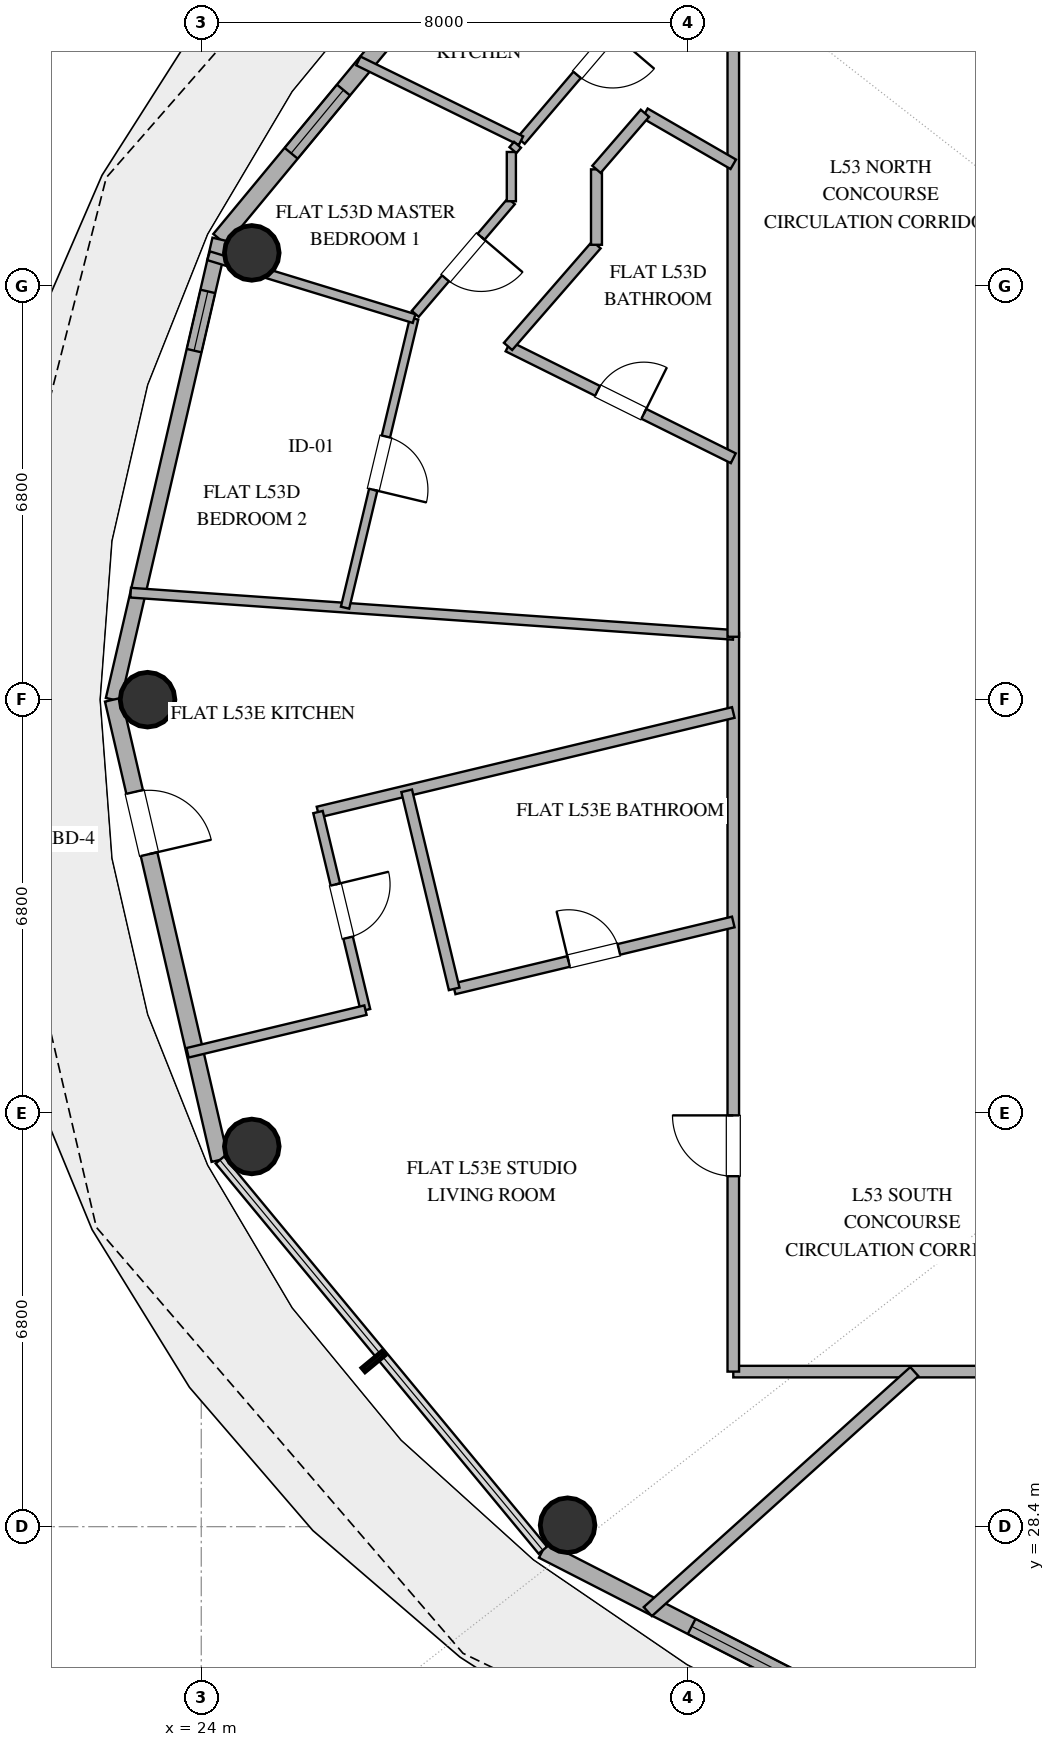
"""IFC4 building model, lengths in metres.
Left out: names, types, materials, properties, quantities, classifications, styles, units other than length and angle.
Written with IfcOpenShell. Run it as: python <this file> out.ifc"""

import sys

from ifc_helpers import new_model, si_unit, direction, frame, frame_2d, origin, origin_2d, place, context, subcontext, project, spatial, rectangle, hollow_circle, extrude, element, fill, save


model = new_model("IFC4")
c1 = context("Model", 3, precision=1e-05, world=origin(), true_north=direction((0.0, 1.0)))
c2 = subcontext(c1, "Body", "Model", "MODEL_VIEW")
j1 = project(units=[si_unit("LENGTHUNIT", "METRE"), si_unit("PLANEANGLEUNIT", "RADIAN")], contexts=[c1])
p1 = place(None, origin())
s1 = spatial("IfcSite", under=j1, at=p1, CompositionType="ELEMENT")
p2 = place(p1, origin())
s2 = spatial("IfcBuilding", under=s1, at=p2, CompositionType="ELEMENT")
p3 = place(p2, frame((0.0, 0.0, 210.0)))
s3 = spatial("IfcBuildingStorey", under=s2, at=p3, CompositionType="ELEMENT", Elevation=210.0)
for number, where, z_axis, x_axis in (
    (1, (24.831, 49.347, 0.0), (0.0, 0.0, 1.0), (1.0, 0.0, 0.0)),
    (2, (23.117, 42.0, 0.0), (0.0, 0.0, 1.0), (1.0, 0.0, 0.0)),
    (3, (24.831, 34.653, 0.0), (0.0, 0.0, 1.0), (1.0, 0.0, 0.0)),
    (4, (30.025, 28.424, 0.0), (0.0, 0.0, 1.0), (1.0, 0.0, 0.0)),
):
    element("IfcColumn", number, at=place(p3, frame(where, z_axis=z_axis, x_axis=x_axis)), inside=s3, PredefinedType="COLUMN", context=c2, shape_type="SweptSolid", body=[
        extrude(hollow_circle(Radius=0.45, WallThickness=0.025, at=origin_2d()), origin(), (0.0, 0.0, 1.0), 3.36),
    ])
p4 = place(p3, frame((29.617, 55.987, 0.0), z_axis=(0.0, 0.0, 1.0), x_axis=(-0.63761509934, -0.770355103243, 0.0)))
e5 = element("IfcWall", 5, at=p4, inside=s3, PredefinedType="SOLIDWALL", context=c2, shape_type="SweptSolid", body=[
    extrude(rectangle(XDim=8.33, YDim=0.28, at=frame_2d((4.165, 0.0))), origin(), (0.0, 0.0, 1.0), 3.36),
])
p5 = place(p4, frame((2.162, 0.0, 0.85)))
e6 = element("IfcOpeningElement", 6, at=p5, cuts=e5, PredefinedType="OPENING", context=c2, shape_type="SweptSolid", body=[
    extrude(rectangle(XDim=1.5, YDim=1.8, at=frame_2d((0.75, 0.9))), frame((0.0, 0.15, 0.0), z_axis=(0.0, -1.0, 0.0), x_axis=(1.0, 0.0, 0.0)), (0.0, 0.0, 1.0), 0.3),
])
p6 = place(p4, frame((5.142, 0.0, 0.85)))
e7 = element("IfcOpeningElement", 7, at=p6, cuts=e5, PredefinedType="OPENING", context=c2, shape_type="SweptSolid", body=[
    extrude(rectangle(XDim=1.35, YDim=1.8, at=frame_2d((0.675, 0.9))), frame((0.0, 0.15, 0.0), z_axis=(0.0, -1.0, 0.0), x_axis=(1.0, 0.0, 0.0)), (0.0, 0.0, 1.0), 0.3),
])
p7 = place(p3, frame((24.306, 49.57, 0.0), z_axis=(0.0, 0.0, 1.0), x_axis=(-0.225635078214, -0.974211892495, 0.0)))
e8 = element("IfcWall", 8, at=p7, inside=s3, PredefinedType="SOLIDWALL", context=c2, shape_type="SweptSolid", body=[
    extrude(rectangle(XDim=7.77, YDim=0.25, at=frame_2d((3.885, 0.0))), origin(), (0.0, 0.0, 1.0), 3.36),
])
p8 = place(p7, frame((0.878, 0.0, 0.35)))
e9 = element("IfcOpeningElement", 9, at=p8, cuts=e8, PredefinedType="OPENING", context=c2, shape_type="SweptSolid", body=[
    extrude(rectangle(XDim=1.0, YDim=1.05, at=frame_2d((0.5, 0.525))), frame((0.0, 0.135, 0.0), z_axis=(0.0, -1.0, 0.0), x_axis=(1.0, 0.0, 0.0)), (0.0, 0.0, 1.0), 0.27),
])
p9 = place(p3, frame((22.553, 42.0, 0.0), z_axis=(0.0, 0.0, 1.0), x_axis=(0.225635078214, -0.974211892495, 0.0)))
e10 = element("IfcWall", 10, at=p9, inside=s3, PredefinedType="SOLIDWALL", context=c2, shape_type="SweptSolid", body=[
    extrude(rectangle(XDim=7.77, YDim=0.28, at=frame_2d((3.885, 0.0))), origin(), (0.0, 0.0, 1.0), 3.36),
])
p10 = place(p9, frame((1.557, 0.0, 0.0)))
e11 = element("IfcOpeningElement", 11, at=p10, cuts=e10, PredefinedType="OPENING", context=c2, shape_type="SweptSolid", body=[
    extrude(rectangle(XDim=1.05, YDim=2.2, at=frame_2d((0.525, 1.1))), frame((0.0, 0.15, 0.0), z_axis=(0.0, -1.0, 0.0), x_axis=(1.0, 0.0, 0.0)), (0.0, 0.0, 1.0), 0.3),
])
p11 = place(p3, frame((29.617, 28.013, 0.0), z_axis=(0.0, 0.0, 1.0), x_axis=(0.890007394051, -0.455946091699, 0.0)))
e12 = element("IfcWall", 12, at=p11, inside=s3, PredefinedType="SOLIDWALL", context=c2, shape_type="SweptSolid", body=[
    extrude(rectangle(XDim=9.404, YDim=0.28, at=frame_2d((4.702, 0.0))), origin(), (0.0, 0.0, 1.0), 3.36),
])
p12 = place(p11, frame((2.751, 0.0, 0.85)))
e13 = element("IfcOpeningElement", 13, at=p12, cuts=e12, PredefinedType="OPENING", context=c2, shape_type="SweptSolid", body=[
    extrude(rectangle(XDim=2.1, YDim=2.2, at=frame_2d((1.05, 1.1))), frame((0.0, 0.15, 0.0), z_axis=(0.0, -1.0, 0.0), x_axis=(1.0, 0.0, 0.0)), (0.0, 0.0, 1.0), 0.3),
])
p13 = place(p11, frame((5.354, 0.0, 0.85)))
e14 = element("IfcOpeningElement", 14, at=p13, cuts=e12, PredefinedType="OPENING", context=c2, shape_type="SweptSolid", body=[
    extrude(rectangle(XDim=2.1, YDim=2.2, at=frame_2d((1.05, 1.1))), frame((0.0, 0.15, 0.0), z_axis=(0.0, -1.0, 0.0), x_axis=(1.0, 0.0, 0.0)), (0.0, 0.0, 1.0), 0.3),
])
p14 = place(p3, frame((48.162, 30.95, 0.0), z_axis=(0.0, 0.0, 1.0), x_axis=(-1.0, 0.0, 0.0)))
e15 = element("IfcWall", 15, at=p14, inside=s3, PredefinedType="PARTITIONING", context=c2, shape_type="SweptSolid", body=[
    extrude(rectangle(XDim=15.412, YDim=0.19, at=frame_2d((7.706, 0.0))), origin(), (0.0, 0.0, 1.0), 2.72),
])
p15 = place(p14, frame((6.193, 0.0, 0.0)))
e16 = element("IfcOpeningElement", 16, at=p15, cuts=e15, PredefinedType="OPENING", context=c2, shape_type="SweptSolid", body=[
    extrude(rectangle(XDim=1.0, YDim=2.2, at=frame_2d((0.5, 1.1))), frame((0.0, 0.105, 0.0), z_axis=(0.0, -1.0, 0.0), x_axis=(1.0, 0.0, 0.0)), (0.0, 0.0, 1.0), 0.21),
])
p16 = place(p3, frame((32.75, 30.95, 0.0), z_axis=(0.0, 0.0, 1.0), x_axis=(0.0, 1.0, 0.0)))
e17 = element("IfcWall", 17, at=p16, inside=s3, PredefinedType="PARTITIONING", context=c2, shape_type="SweptSolid", body=[
    extrude(rectangle(XDim=12.148, YDim=0.19, at=frame_2d((6.074, 0.0))), origin(), (0.0, 0.0, 1.0), 2.72),
])
p17 = place(p16, frame((3.214, 0.0, 0.0)))
e18 = element("IfcOpeningElement", 18, at=p17, cuts=e17, PredefinedType="OPENING", context=c2, shape_type="SweptSolid", body=[
    extrude(rectangle(XDim=1.0, YDim=2.2, at=frame_2d((0.5, 1.1))), frame((0.0, 0.105, 0.0), z_axis=(0.0, -1.0, 0.0), x_axis=(1.0, 0.0, 0.0)), (0.0, 0.0, 1.0), 0.21),
])
p18 = place(p3, frame((22.839, 43.76, 0.0), z_axis=(0.0, 0.0, 1.0), x_axis=(0.997563620801, -0.069762615023, 0.0)))
e19 = element("IfcWall", 19, at=p18, inside=s3, PredefinedType="PLUMBINGWALL", context=c2, shape_type="SweptSolid", body=[
    extrude(rectangle(XDim=9.935, YDim=0.16, at=frame_2d((4.968, 0.0))), origin(), (0.0, 0.0, 1.0), 2.72),
])
p19 = place(p3, frame((35.728, 30.95, 0.0), z_axis=(0.0, 0.0, 1.0), x_axis=(-0.743158305959, -0.669115634464, 0.0)))
e20 = element("IfcWall", 20, at=p19, inside=s3, PredefinedType="PARTITIONING", context=c2, shape_type="SweptSolid", body=[
    extrude(rectangle(XDim=5.899, YDim=0.2, at=frame_2d((2.949, 0.0))), origin(), (0.0, 0.0, 1.0), 2.72),
])
p20 = place(p3, frame((32.75, 41.789, 0.0), z_axis=(0.0, 0.0, 1.0), x_axis=(-0.97245226222, -0.233102118618, 0.0)))
e21 = element("IfcWall", 21, at=p20, inside=s3, PredefinedType="PLUMBINGWALL", context=c2, shape_type="SweptSolid", body=[
    extrude(rectangle(XDim=7.024, YDim=0.18, at=frame_2d((3.512, 0.0))), origin(), (0.0, 0.0, 1.0), 2.72),
])
p21 = place(p3, frame((32.75, 43.034, 0.0), z_axis=(0.0, 0.0, 1.0), x_axis=(0.0, 1.0, 0.0)))
e22 = element("IfcWall", 22, at=p21, inside=s3, PredefinedType="PARTITIONING", context=c2, shape_type="SweptSolid", body=[
    extrude(rectangle(XDim=10.016, YDim=0.19, at=frame_2d((5.008, 0.0))), origin(), (0.0, 0.0, 1.0), 2.72),
])
p22 = place(p3, frame((27.5, 48.267, 0.0), z_axis=(0.0, 0.0, 1.0), x_axis=(-0.232297954947, -0.972644673109, 0.0)))
e23 = element("IfcWall", 23, at=p22, inside=s3, PredefinedType="PARTITIONING", context=c2, shape_type="SweptSolid", body=[
    extrude(rectangle(XDim=4.888, YDim=0.14, at=frame_2d((2.444, 0.0))), origin(), (0.0, 0.0, 1.0), 2.72),
])
p23 = place(p22, frame((1.994, 0.0, 0.0)))
e24 = element("IfcOpeningElement", 24, at=p23, cuts=e23, PredefinedType="OPENING", context=c2, shape_type="SweptSolid", body=[
    extrude(rectangle(XDim=0.9, YDim=2.1, at=frame_2d((0.45, 1.05))), frame((0.0, 0.08, 0.0), z_axis=(0.0, -1.0, 0.0), x_axis=(1.0, 0.0, 0.0)), (0.0, 0.0, 1.0), 0.16),
])
p24 = place(p3, frame((28.159, 37.244, 0.0), z_axis=(0.0, 0.0, 1.0), x_axis=(0.972442669344, 0.233142134415, 0.0)))
e25 = element("IfcWall", 25, at=p24, inside=s3, PredefinedType="PLUMBINGWALL", context=c2, shape_type="SweptSolid", body=[
    extrude(rectangle(XDim=4.721, YDim=0.18, at=frame_2d((2.36, 0.0))), origin(), (0.0, 0.0, 1.0), 2.72),
])
p25 = place(p24, frame((1.935, 0.0, 0.0)))
e26 = element("IfcOpeningElement", 26, at=p25, cuts=e25, PredefinedType="OPENING", context=c2, shape_type="SweptSolid", body=[
    extrude(rectangle(XDim=0.85, YDim=2.1, at=frame_2d((0.425, 1.05))), frame((0.0, 0.1, 0.0), z_axis=(0.0, -1.0, 0.0), x_axis=(1.0, 0.0, 0.0)), (0.0, 0.0, 1.0), 0.2),
])
p26 = place(p3, frame((29.046, 47.809, 0.0), z_axis=(0.0, 0.0, 1.0), x_axis=(0.895675225239, -0.444708770876, 0.0)))
e27 = element("IfcWall", 27, at=p26, inside=s3, PredefinedType="PLUMBINGWALL", context=c2, shape_type="SweptSolid", body=[
    extrude(rectangle(XDim=4.135, YDim=0.18, at=frame_2d((2.068, 0.0))), origin(), (0.0, 0.0, 1.0), 2.72),
])
p27 = place(p26, frame((1.643, 0.0, 0.0)))
e28 = element("IfcOpeningElement", 28, at=p27, cuts=e27, PredefinedType="OPENING", context=c2, shape_type="SweptSolid", body=[
    extrude(rectangle(XDim=0.85, YDim=2.1, at=frame_2d((0.425, 1.05))), frame((0.0, 0.1, 0.0), z_axis=(0.0, -1.0, 0.0), x_axis=(1.0, 0.0, 0.0)), (0.0, 0.0, 1.0), 0.2),
])
p28 = place(p3, frame((31.689, 54.042, 0.0), z_axis=(0.0, 0.0, 1.0), x_axis=(-0.648996547252, -0.760791352248, 0.0)))
e29 = element("IfcWall", 29, at=p28, inside=s3, PredefinedType="PLUMBINGWALL", context=c2, shape_type="SweptSolid", body=[
    extrude(rectangle(XDim=3.745, YDim=0.16, at=frame_2d((1.873, 0.0))), origin(), (0.0, 0.0, 1.0), 2.72),
])
p29 = place(p28, frame((1.423, 0.0, 0.0)))
e30 = element("IfcOpeningElement", 30, at=p29, cuts=e29, PredefinedType="OPENING", context=c2, shape_type="SweptSolid", body=[
    extrude(rectangle(XDim=0.9, YDim=2.1, at=frame_2d((0.45, 1.05))), frame((0.0, 0.09, 0.0), z_axis=(0.0, -1.0, 0.0), x_axis=(1.0, 0.0, 0.0)), (0.0, 0.0, 1.0), 0.18),
])
p30 = place(p3, frame((27.5, 48.267, 0.0), z_axis=(0.0, 0.0, 1.0), x_axis=(-0.956303289689, 0.292376500647, 0.0)))
e31 = element("IfcWall", 31, at=p30, inside=s3, PredefinedType="PARTITIONING", context=c2, shape_type="SweptSolid", body=[
    extrude(rectangle(XDim=3.534, YDim=0.15, at=frame_2d((1.767, 0.0))), origin(), (0.0, 0.0, 1.0), 2.72),
])
p31 = place(p3, frame((27.378, 40.501, 0.0), z_axis=(0.0, 0.0, 1.0), x_axis=(0.233144161333, -0.97244218339, 0.0)))
e32 = element("IfcWall", 32, at=p31, inside=s3, PredefinedType="PLUMBINGWALL", context=c2, shape_type="SweptSolid", body=[
    extrude(rectangle(XDim=3.35, YDim=0.18, at=frame_2d((1.675, 0.0))), origin(), (0.0, 0.0, 1.0), 2.72),
])
p32 = place(p3, frame((25.92, 40.152, 0.0), z_axis=(0.0, 0.0, 1.0), x_axis=(0.233075240748, -0.972458704599, 0.0)))
e33 = element("IfcWall", 33, at=p32, inside=s3, PredefinedType="PLUMBINGWALL", context=c2, shape_type="SweptSolid", body=[
    extrude(rectangle(XDim=3.35, YDim=0.16, at=frame_2d((1.675, 0.0))), origin(), (0.0, 0.0, 1.0), 2.72),
])
p33 = place(p32, frame((1.225, 0.0, 0.0)))
e34 = element("IfcOpeningElement", 34, at=p33, cuts=e33, PredefinedType="OPENING", context=c2, shape_type="SweptSolid", body=[
    extrude(rectangle(XDim=0.9, YDim=2.1, at=frame_2d((0.45, 1.05))), frame((0.0, 0.09, 0.0), z_axis=(0.0, -1.0, 0.0), x_axis=(1.0, 0.0, 0.0)), (0.0, 0.0, 1.0), 0.18),
])
p34 = place(p3, frame((26.701, 36.894, 0.0), z_axis=(0.0, 0.0, 1.0), x_axis=(-0.972463854185, -0.233053754107, 0.0)))
e35 = element("IfcWall", 35, at=p34, inside=s3, PredefinedType="PLUMBINGWALL", context=c2, shape_type="SweptSolid", body=[
    extrude(rectangle(XDim=3.009, YDim=0.16, at=frame_2d((1.504, 0.0))), origin(), (0.0, 0.0, 1.0), 2.72),
])
p35 = place(p3, frame((29.258, 51.193, 0.0), z_axis=(0.0, 0.0, 1.0), x_axis=(-0.897810810902, 0.440381366348, 0.0)))
e36 = element("IfcWall", 36, at=p35, inside=s3, PredefinedType="PLUMBINGWALL", context=c2, shape_type="SweptSolid", body=[
    extrude(rectangle(XDim=2.979, YDim=0.16, at=frame_2d((1.489, 0.0))), origin(), (0.0, 0.0, 1.0), 2.72),
])
p36 = place(p3, frame((29.1, 50.197, 0.0), z_axis=(0.0, 0.0, 1.0), x_axis=(-0.649270866973, -0.760557257082, 0.0)))
e37 = element("IfcWall", 37, at=p36, inside=s3, PredefinedType="PARTITIONING", context=c2, shape_type="SweptSolid", body=[
    extrude(rectangle(XDim=2.435, YDim=0.15, at=frame_2d((1.218, 0.0))), origin(), (0.0, 0.0, 1.0), 2.72),
])
p37 = place(p36, frame((0.768, 0.0, 0.0)))
e38 = element("IfcOpeningElement", 38, at=p37, cuts=e37, PredefinedType="OPENING", context=c2, shape_type="SweptSolid", body=[
    extrude(rectangle(XDim=0.9, YDim=2.1, at=frame_2d((0.45, 1.05))), frame((0.0, 0.085, 0.0), z_axis=(0.0, -1.0, 0.0), x_axis=(1.0, 0.0, 0.0)), (0.0, 0.0, 1.0), 0.17),
])
p38 = place(p3, frame((30.5, 49.481, 0.0), z_axis=(0.0, 0.0, 1.0), x_axis=(-0.656364223854, -0.754444169998, 0.0)))
e39 = element("IfcWall", 39, at=p38, inside=s3, PredefinedType="PLUMBINGWALL", context=c2, shape_type="SweptSolid", body=[
    extrude(rectangle(XDim=2.215, YDim=0.18, at=frame_2d((1.108, 0.0))), origin(), (0.0, 0.0, 1.0), 2.72),
])
p39 = place(p3, frame((32.75, 50.805, 0.0), z_axis=(0.0, 0.0, 1.0), x_axis=(-0.866013522419, 0.500020578564, 0.0)))
e40 = element("IfcWall", 40, at=p39, inside=s3, PredefinedType="PLUMBINGWALL", context=c2, shape_type="SweptSolid", body=[
    extrude(rectangle(XDim=1.678, YDim=0.18, at=frame_2d((0.839, 0.0))), origin(), (0.0, 0.0, 1.0), 2.72),
])
p40 = place(p3, frame((30.5, 50.721, 0.0), z_axis=(0.0, 0.0, 1.0), x_axis=(0.0, -1.0, 0.0)))
e41 = element("IfcWall", 41, at=p40, inside=s3, PredefinedType="PLUMBINGWALL", context=c2, shape_type="SweptSolid", body=[
    extrude(rectangle(XDim=1.24, YDim=0.18, at=frame_2d((0.62, 0.0))), origin(), (0.0, 0.0, 1.0), 2.72),
])
p41 = place(p3, frame((31.297, 51.644, 0.0), z_axis=(0.0, 0.0, 1.0), x_axis=(-0.653870108477, -0.756606820773, 0.0)))
e42 = element("IfcWall", 42, at=p41, inside=s3, PredefinedType="PLUMBINGWALL", context=c2, shape_type="SweptSolid", body=[
    extrude(rectangle(XDim=1.219, YDim=0.18, at=frame_2d((0.609, 0.0))), origin(), (0.0, 0.0, 1.0), 2.72),
])
p42 = place(p3, frame((29.1, 51.007, 0.0), z_axis=(0.0, 0.0, 1.0), x_axis=(0.0, -1.0, 0.0)))
e43 = element("IfcWall", 43, at=p42, inside=s3, PredefinedType="PARTITIONING", context=c2, shape_type="SweptSolid", body=[
    extrude(rectangle(XDim=0.81, YDim=0.15, at=frame_2d((0.405, 0.0))), origin(), (0.0, 0.0, 1.0), 2.72),
])
p43 = place(p3, frame((29.201, 51.126, 0.0), z_axis=(0.0, 0.0, 1.0), x_axis=(-0.649232735888, -0.760589807092, 0.0)))
e44 = element("IfcWall", 44, at=p43, inside=s3, PredefinedType="PARTITIONING", context=c2, shape_type="SweptSolid", body=[
    extrude(rectangle(XDim=0.116, YDim=0.15, at=frame_2d((0.058, 0.0))), origin(), (0.0, 0.0, 1.0), 2.72),
])
p44 = place(p6, origin())
e45 = element("IfcWindow", 45, at=p44, inside=s3, PartitioningType="SINGLE_PANEL", PredefinedType="WINDOW", context=c2, shape_type="SweptSolid", body=[
    extrude(rectangle(XDim=1.35, YDim=1.8, at=frame_2d((0.675, 0.9))), frame((0.0, 0.03, 0.0), z_axis=(0.0, -1.0, 0.0), x_axis=(1.0, 0.0, 0.0)), (0.0, 0.0, 1.0), 0.06),
])
fill(e7, e45)
p45 = place(p10, origin())
e46 = element("IfcDoor", 46, at=p45, inside=s3, OperationType="SINGLE_SWING_RIGHT", PredefinedType="DOOR", context=c2, shape_type="SweptSolid", body=[
    extrude(rectangle(XDim=1.05, YDim=2.2, at=frame_2d((0.525, 1.1))), frame((0.0, 0.025, 0.0), z_axis=(0.0, -1.0, 0.0), x_axis=(1.0, 0.0, 0.0)), (0.0, 0.0, 1.0), 0.05),
])
fill(e11, e46)
p46 = place(p12, origin())
e47 = element("IfcWindow", 47, at=p46, inside=s3, PartitioningType="SINGLE_PANEL", PredefinedType="WINDOW", context=c2, shape_type="SweptSolid", body=[
    extrude(rectangle(XDim=2.1, YDim=2.2, at=frame_2d((1.05, 1.1))), frame((0.0, 0.03, 0.0), z_axis=(0.0, -1.0, 0.0), x_axis=(1.0, 0.0, 0.0)), (0.0, 0.0, 1.0), 0.06),
])
fill(e13, e47)
p47 = place(p8, origin())
e48 = element("IfcWindow", 48, at=p47, inside=s3, PartitioningType="SINGLE_PANEL", PredefinedType="WINDOW", context=c2, shape_type="SweptSolid", body=[
    extrude(rectangle(XDim=1.0, YDim=1.05, at=frame_2d((0.5, 0.525))), frame((0.0, 0.03, 0.0), z_axis=(0.0, -1.0, 0.0), x_axis=(1.0, 0.0, 0.0)), (0.0, 0.0, 1.0), 0.06),
])
fill(e9, e48)
p48 = place(p17, origin())
e49 = element("IfcDoor", 49, at=p48, inside=s3, OperationType="SINGLE_SWING_RIGHT", PredefinedType="DOOR", context=c2, shape_type="SweptSolid", body=[
    extrude(rectangle(XDim=1.0, YDim=2.2, at=frame_2d((0.5, 1.1))), frame((0.0, 0.025, 0.0), z_axis=(0.0, -1.0, 0.0), x_axis=(1.0, 0.0, 0.0)), (0.0, 0.0, 1.0), 0.05),
])
fill(e18, e49)
p49 = place(p23, origin())
e50 = element("IfcDoor", 50, at=p49, inside=s3, OperationType="SINGLE_SWING_RIGHT", PredefinedType="DOOR", context=c2, shape_type="SweptSolid", body=[
    extrude(rectangle(XDim=0.9, YDim=2.1, at=frame_2d((0.45, 1.05))), frame((0.0, 0.025, 0.0), z_axis=(0.0, -1.0, 0.0), x_axis=(1.0, 0.0, 0.0)), (0.0, 0.0, 1.0), 0.05),
])
fill(e24, e50)
p50 = place(p25, origin())
e51 = element("IfcDoor", 51, at=p50, inside=s3, OperationType="SINGLE_SWING_LEFT", PredefinedType="DOOR", context=c2, shape_type="SweptSolid", body=[
    extrude(rectangle(XDim=0.85, YDim=2.1, at=frame_2d((0.425, 1.05))), frame((0.0, 0.025, 0.0), z_axis=(0.0, -1.0, 0.0), x_axis=(1.0, 0.0, 0.0)), (0.0, 0.0, 1.0), 0.05),
])
fill(e26, e51)
p51 = place(p27, origin())
e52 = element("IfcDoor", 52, at=p51, inside=s3, OperationType="SINGLE_SWING_RIGHT", PredefinedType="DOOR", context=c2, shape_type="SweptSolid", body=[
    extrude(rectangle(XDim=0.85, YDim=2.1, at=frame_2d((0.425, 1.05))), frame((0.0, 0.025, 0.0), z_axis=(0.0, -1.0, 0.0), x_axis=(1.0, 0.0, 0.0)), (0.0, 0.0, 1.0), 0.05),
])
fill(e28, e52)
p52 = place(p29, origin())
e53 = element("IfcDoor", 53, at=p52, inside=s3, OperationType="SINGLE_SWING_LEFT", PredefinedType="DOOR", context=c2, shape_type="SweptSolid", body=[
    extrude(rectangle(XDim=0.9, YDim=2.1, at=frame_2d((0.45, 1.05))), frame((0.0, 0.025, 0.0), z_axis=(0.0, -1.0, 0.0), x_axis=(1.0, 0.0, 0.0)), (0.0, 0.0, 1.0), 0.05),
])
fill(e30, e53)
p53 = place(p33, origin())
e54 = element("IfcDoor", 54, at=p53, inside=s3, OperationType="SINGLE_SWING_LEFT", PredefinedType="DOOR", context=c2, shape_type="SweptSolid", body=[
    extrude(rectangle(XDim=0.9, YDim=2.1, at=frame_2d((0.45, 1.05))), frame((0.0, 0.025, 0.0), z_axis=(0.0, -1.0, 0.0), x_axis=(1.0, 0.0, 0.0)), (0.0, 0.0, 1.0), 0.05),
])
fill(e34, e54)
p54 = place(p37, origin())
e55 = element("IfcDoor", 55, at=p54, inside=s3, OperationType="SINGLE_SWING_LEFT", PredefinedType="DOOR", context=c2, shape_type="SweptSolid", body=[
    extrude(rectangle(XDim=0.9, YDim=2.1, at=frame_2d((0.45, 1.05))), frame((0.0, 0.025, 0.0), z_axis=(0.0, -1.0, 0.0), x_axis=(1.0, 0.0, 0.0)), (0.0, 0.0, 1.0), 0.05),
])
fill(e38, e55)
save(model, sys.argv[1])
